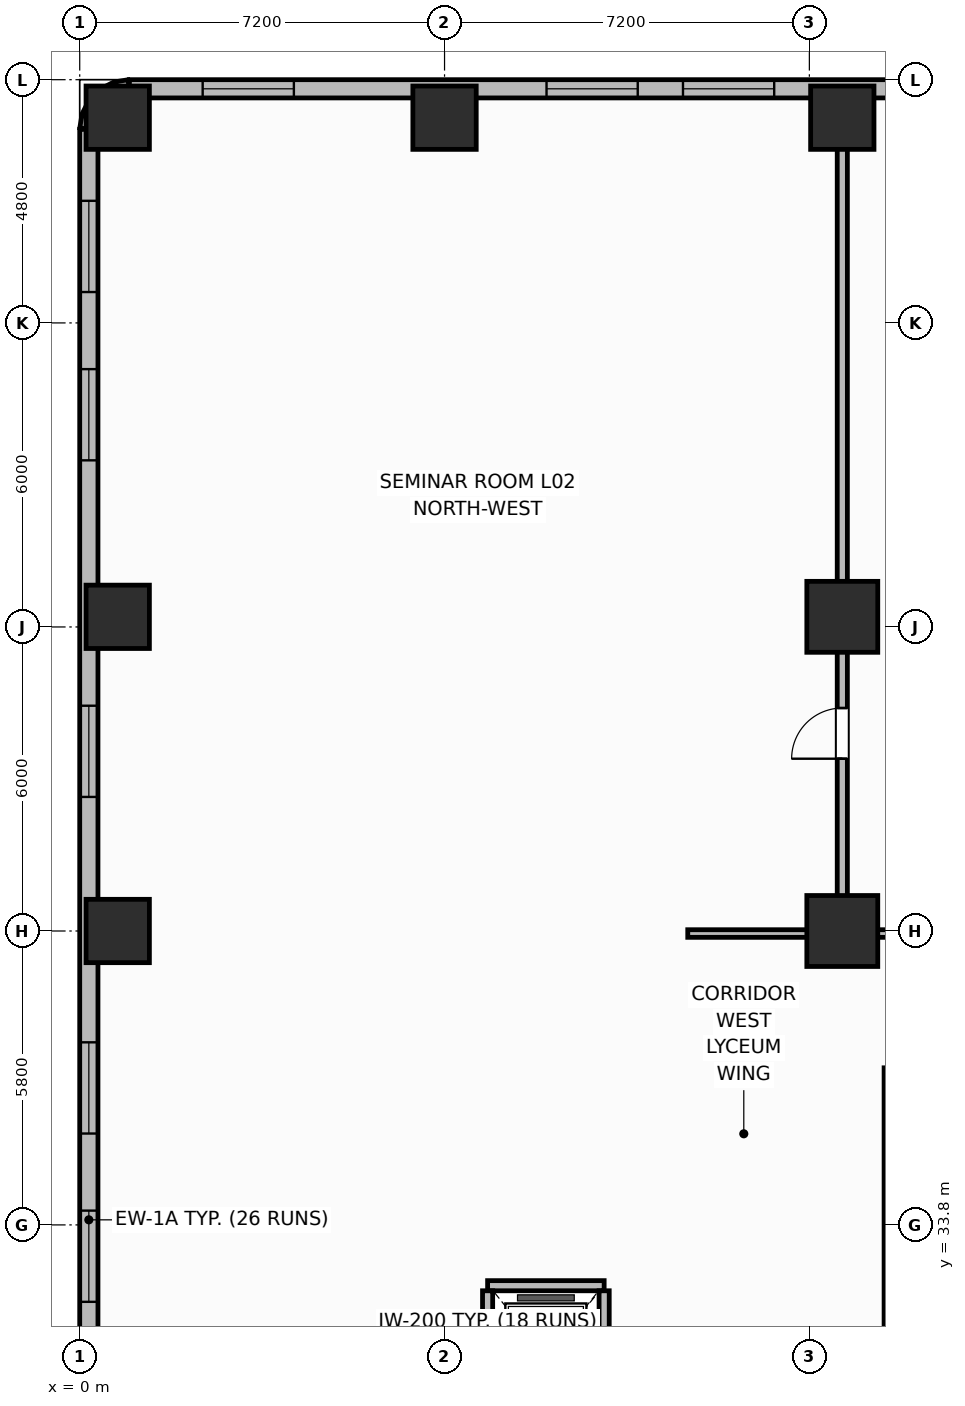
"""IFC4 building model, lengths in metres.
Left out: names, types, materials, properties, quantities, classifications, styles, units other than length and angle.
Written with IfcOpenShell. Run it as: python <this file> out.ifc"""

import sys

from ifc_helpers import new_model, si_unit, direction, frame, frame_2d, origin, origin_2d, place, context, subcontext, project, spatial, rectangle, extrude, element, fill, save


model = new_model("IFC4")
c1 = context("Model", 3, precision=1e-05, world=origin(), true_north=direction((0.0, 1.0)))
c2 = subcontext(c1, "Body", "Model", "MODEL_VIEW")
j1 = project(units=[si_unit("LENGTHUNIT", "METRE"), si_unit("PLANEANGLEUNIT", "RADIAN")], contexts=[c1])
p1 = place(None, origin())
s1 = spatial("IfcSite", under=j1, at=p1, CompositionType="ELEMENT")
p2 = place(p1, origin())
s2 = spatial("IfcBuilding", under=s1, at=p2, CompositionType="ELEMENT")
p3 = place(p2, frame((0.0, 0.0, 11.1)))
s3 = spatial("IfcBuildingStorey", under=s2, at=p3, CompositionType="ELEMENT", Elevation=11.1)
for number, where, z_axis, x_axis in (
    (1, (0.75, 39.6, 0.0), (0.0, 0.0, 1.0), (1.0, 0.0, 0.0)),
    (2, (0.75, 45.8, 0.0), (0.0, 0.0, 1.0), (1.0, 0.0, 0.0)),
    (3, (0.75, 55.65, 0.0), (0.0, 0.0, 1.0), (1.0, 0.0, 0.0)),
    (4, (7.2, 55.65, 0.0), (0.0, 0.0, 1.0), (1.0, 0.0, 0.0)),
    (5, (15.05, 55.65, 0.0), (0.0, 0.0, 1.0), (1.0, 0.0, 0.0)),
):
    element("IfcColumn", number, at=place(p3, frame(where, z_axis=z_axis, x_axis=x_axis)), inside=s3, PredefinedType="COLUMN", context=c2, shape_type="SweptSolid", body=[
        extrude(rectangle(XDim=1.25, YDim=1.25, at=origin_2d()), origin(), (0.0, 0.0, 1.0), 4.5),
    ])
for number, where, z_axis, x_axis in (
    (6, (15.05, 39.6, 0.0), (0.0, 0.0, 1.0), (1.0, 0.0, 0.0)),
    (7, (15.05, 45.8, 0.0), (0.0, 0.0, 1.0), (1.0, 0.0, 0.0)),
):
    element("IfcColumn", number, at=place(p3, frame(where, z_axis=z_axis, x_axis=x_axis)), inside=s3, PredefinedType="COLUMN", context=c2, shape_type="SweptSolid", body=[
        extrude(rectangle(XDim=1.4, YDim=1.4, at=origin_2d()), origin(), (0.0, 0.0, 1.0), 4.5),
    ])
p4 = place(p3, frame((56.57, 56.22, 0.0), z_axis=(0.0, 0.0, 1.0), x_axis=(-1.0, 0.0, 0.0)))
e8 = element("IfcWall", 8, at=p4, inside=s3, PredefinedType="SOLIDWALL", context=c2, shape_type="SweptSolid", body=[
    extrude(rectangle(XDim=55.59, YDim=0.36, at=frame_2d((27.795, 0.0))), origin(), (0.0, 0.0, 1.0), 3.48),
])
p5 = place(p4, frame((0.747, 0.0, 0.9)))
e9 = element("IfcOpeningElement", 9, at=p5, cuts=e8, PredefinedType="OPENING", context=c2, shape_type="SweptSolid", body=[
    extrude(rectangle(XDim=1.8, YDim=2.1, at=frame_2d((0.9, 1.05))), frame((0.0, 0.19, 0.0), z_axis=(0.0, -1.0, 0.0), x_axis=(1.0, 0.0, 0.0)), (0.0, 0.0, 1.0), 0.38),
])
p6 = place(p4, frame((5.19, 0.0, 0.9)))
e10 = element("IfcOpeningElement", 10, at=p6, cuts=e8, PredefinedType="OPENING", context=c2, shape_type="SweptSolid", body=[
    extrude(rectangle(XDim=1.8, YDim=2.1, at=frame_2d((0.9, 1.05))), frame((0.0, 0.19, 0.0), z_axis=(0.0, -1.0, 0.0), x_axis=(1.0, 0.0, 0.0)), (0.0, 0.0, 1.0), 0.38),
])
p7 = place(p4, frame((8.233, 0.0, 0.9)))
e11 = element("IfcOpeningElement", 11, at=p7, cuts=e8, PredefinedType="OPENING", context=c2, shape_type="SweptSolid", body=[
    extrude(rectangle(XDim=1.8, YDim=2.1, at=frame_2d((0.9, 1.05))), frame((0.0, 0.19, 0.0), z_axis=(0.0, -1.0, 0.0), x_axis=(1.0, 0.0, 0.0)), (0.0, 0.0, 1.0), 0.38),
])
p8 = place(p4, frame((11.626, 0.0, 0.9)))
e12 = element("IfcOpeningElement", 12, at=p8, cuts=e8, PredefinedType="OPENING", context=c2, shape_type="SweptSolid", body=[
    extrude(rectangle(XDim=1.8, YDim=2.1, at=frame_2d((0.9, 1.05))), frame((0.0, 0.19, 0.0), z_axis=(0.0, -1.0, 0.0), x_axis=(1.0, 0.0, 0.0)), (0.0, 0.0, 1.0), 0.38),
])
p9 = place(p4, frame((14.319, 0.0, 0.9)))
e13 = element("IfcOpeningElement", 13, at=p9, cuts=e8, PredefinedType="OPENING", context=c2, shape_type="SweptSolid", body=[
    extrude(rectangle(XDim=1.8, YDim=2.1, at=frame_2d((0.9, 1.05))), frame((0.0, 0.19, 0.0), z_axis=(0.0, -1.0, 0.0), x_axis=(1.0, 0.0, 0.0)), (0.0, 0.0, 1.0), 0.38),
])
p10 = place(p4, frame((18.762, 0.0, 0.9)))
e14 = element("IfcOpeningElement", 14, at=p10, cuts=e8, PredefinedType="OPENING", context=c2, shape_type="SweptSolid", body=[
    extrude(rectangle(XDim=1.8, YDim=2.1, at=frame_2d((0.9, 1.05))), frame((0.0, 0.19, 0.0), z_axis=(0.0, -1.0, 0.0), x_axis=(1.0, 0.0, 0.0)), (0.0, 0.0, 1.0), 0.38),
])
p11 = place(p4, frame((21.805, 0.0, 0.9)))
e15 = element("IfcOpeningElement", 15, at=p11, cuts=e8, PredefinedType="OPENING", context=c2, shape_type="SweptSolid", body=[
    extrude(rectangle(XDim=1.8, YDim=2.1, at=frame_2d((0.9, 1.05))), frame((0.0, 0.19, 0.0), z_axis=(0.0, -1.0, 0.0), x_axis=(1.0, 0.0, 0.0)), (0.0, 0.0, 1.0), 0.38),
])
p12 = place(p4, frame((25.198, 0.0, 0.9)))
e16 = element("IfcOpeningElement", 16, at=p12, cuts=e8, PredefinedType="OPENING", context=c2, shape_type="SweptSolid", body=[
    extrude(rectangle(XDim=1.8, YDim=2.1, at=frame_2d((0.9, 1.05))), frame((0.0, 0.19, 0.0), z_axis=(0.0, -1.0, 0.0), x_axis=(1.0, 0.0, 0.0)), (0.0, 0.0, 1.0), 0.38),
])
p13 = place(p4, frame((27.892, 0.0, 0.9)))
e17 = element("IfcOpeningElement", 17, at=p13, cuts=e8, PredefinedType="OPENING", context=c2, shape_type="SweptSolid", body=[
    extrude(rectangle(XDim=1.8, YDim=2.1, at=frame_2d((0.9, 1.05))), frame((0.0, 0.19, 0.0), z_axis=(0.0, -1.0, 0.0), x_axis=(1.0, 0.0, 0.0)), (0.0, 0.0, 1.0), 0.38),
])
p14 = place(p4, frame((32.335, 0.0, 0.9)))
e18 = element("IfcOpeningElement", 18, at=p14, cuts=e8, PredefinedType="OPENING", context=c2, shape_type="SweptSolid", body=[
    extrude(rectangle(XDim=1.8, YDim=2.1, at=frame_2d((0.9, 1.05))), frame((0.0, 0.19, 0.0), z_axis=(0.0, -1.0, 0.0), x_axis=(1.0, 0.0, 0.0)), (0.0, 0.0, 1.0), 0.38),
])
p15 = place(p4, frame((35.378, 0.0, 0.9)))
e19 = element("IfcOpeningElement", 19, at=p15, cuts=e8, PredefinedType="OPENING", context=c2, shape_type="SweptSolid", body=[
    extrude(rectangle(XDim=1.8, YDim=2.1, at=frame_2d((0.9, 1.05))), frame((0.0, 0.19, 0.0), z_axis=(0.0, -1.0, 0.0), x_axis=(1.0, 0.0, 0.0)), (0.0, 0.0, 1.0), 0.38),
])
p16 = place(p4, frame((38.421, 0.0, 0.9)))
e20 = element("IfcOpeningElement", 20, at=p16, cuts=e8, PredefinedType="OPENING", context=c2, shape_type="SweptSolid", body=[
    extrude(rectangle(XDim=1.8, YDim=2.1, at=frame_2d((0.9, 1.05))), frame((0.0, 0.19, 0.0), z_axis=(0.0, -1.0, 0.0), x_axis=(1.0, 0.0, 0.0)), (0.0, 0.0, 1.0), 0.38),
])
p17 = place(p4, frame((42.864, 0.0, 0.9)))
e21 = element("IfcOpeningElement", 21, at=p17, cuts=e8, PredefinedType="OPENING", context=c2, shape_type="SweptSolid", body=[
    extrude(rectangle(XDim=1.8, YDim=2.1, at=frame_2d((0.9, 1.05))), frame((0.0, 0.19, 0.0), z_axis=(0.0, -1.0, 0.0), x_axis=(1.0, 0.0, 0.0)), (0.0, 0.0, 1.0), 0.38),
])
p18 = place(p4, frame((45.557, 0.0, 0.9)))
e22 = element("IfcOpeningElement", 22, at=p18, cuts=e8, PredefinedType="OPENING", context=c2, shape_type="SweptSolid", body=[
    extrude(rectangle(XDim=1.8, YDim=2.1, at=frame_2d((0.9, 1.05))), frame((0.0, 0.19, 0.0), z_axis=(0.0, -1.0, 0.0), x_axis=(1.0, 0.0, 0.0)), (0.0, 0.0, 1.0), 0.38),
])
p19 = place(p4, frame((52.344, 0.0, 0.9)))
e23 = element("IfcOpeningElement", 23, at=p19, cuts=e8, PredefinedType="OPENING", context=c2, shape_type="SweptSolid", body=[
    extrude(rectangle(XDim=1.8, YDim=2.1, at=frame_2d((0.9, 1.05))), frame((0.0, 0.19, 0.0), z_axis=(0.0, -1.0, 0.0), x_axis=(1.0, 0.0, 0.0)), (0.0, 0.0, 1.0), 0.38),
])
p20 = place(p3, frame((0.98, 56.22, 0.0), z_axis=(0.0, 0.0, 1.0), x_axis=(-0.987731290312, -0.156163049852, 0.0)))
e24 = element("IfcWall", 24, at=p20, inside=s3, PredefinedType="SOLIDWALL", context=c2, shape_type="SweptSolid", body=[
    extrude(rectangle(XDim=0.25, YDim=0.36, at=frame_2d((0.125, 0.0))), origin(), (0.0, 0.0, 1.0), 3.48),
])
p21 = place(p3, frame((0.733, 56.181, 0.0), z_axis=(0.0, 0.0, 1.0), x_axis=(-0.89089067942, -0.454217786225, 0.0)))
e25 = element("IfcWall", 25, at=p21, inside=s3, PredefinedType="SOLIDWALL", context=c2, shape_type="SweptSolid", body=[
    extrude(rectangle(XDim=0.25, YDim=0.36, at=frame_2d((0.125, 0.0))), origin(), (0.0, 0.0, 1.0), 3.48),
])
for number, where, z_axis, x_axis in (
    (26, (0.51, 56.067, 0.0), (0.0, 0.0, 1.0), (-0.707, -0.707, 0.0)),
    (27, (0.333, 55.89, 0.0), (0.0, 0.0, 1.0), (-0.454, -0.891, 0.0)),
):
    element("IfcWall", number, at=place(p3, frame(where, z_axis=z_axis, x_axis=x_axis)), inside=s3, PredefinedType="SOLIDWALL", context=c2, shape_type="SweptSolid", body=[
        extrude(rectangle(XDim=0.25, YDim=0.36, at=frame_2d((0.125, 0.0))), origin(), (0.0, 0.0, 1.0), 3.48),
    ])
p22 = place(p3, frame((0.219, 55.667, 0.0), z_axis=(0.0, 0.0, 1.0), x_axis=(-0.156963773077, -0.987604361038, 0.0)))
e28 = element("IfcWall", 28, at=p22, inside=s3, PredefinedType="SOLIDWALL", context=c2, shape_type="SweptSolid", body=[
    extrude(rectangle(XDim=0.25, YDim=0.36, at=frame_2d((0.125, 0.0))), origin(), (0.0, 0.0, 1.0), 3.48),
])
p23 = place(p3, frame((0.18, 55.42, 0.0), z_axis=(0.0, 0.0, 1.0), x_axis=(0.0, -1.0, 0.0)))
e29 = element("IfcWall", 29, at=p23, inside=s3, PredefinedType="SOLIDWALL", context=c2, shape_type="SweptSolid", body=[
    extrude(rectangle(XDim=54.44, YDim=0.36, at=frame_2d((27.22, 0.0))), origin(), (0.0, 0.0, 1.0), 3.48),
])
p24 = place(p23, frame((1.411, 0.0, 0.9)))
e30 = element("IfcOpeningElement", 30, at=p24, cuts=e29, PredefinedType="OPENING", context=c2, shape_type="SweptSolid", body=[
    extrude(rectangle(XDim=1.8, YDim=2.1, at=frame_2d((0.9, 1.05))), frame((0.0, 0.19, 0.0), z_axis=(0.0, -1.0, 0.0), x_axis=(1.0, 0.0, 0.0)), (0.0, 0.0, 1.0), 0.38),
])
p25 = place(p23, frame((4.732, 0.0, 0.9)))
e31 = element("IfcOpeningElement", 31, at=p25, cuts=e29, PredefinedType="OPENING", context=c2, shape_type="SweptSolid", body=[
    extrude(rectangle(XDim=1.8, YDim=2.1, at=frame_2d((0.9, 1.05))), frame((0.0, 0.19, 0.0), z_axis=(0.0, -1.0, 0.0), x_axis=(1.0, 0.0, 0.0)), (0.0, 0.0, 1.0), 0.38),
])
p26 = place(p23, frame((11.375, 0.0, 0.9)))
e32 = element("IfcOpeningElement", 32, at=p26, cuts=e29, PredefinedType="OPENING", context=c2, shape_type="SweptSolid", body=[
    extrude(rectangle(XDim=1.8, YDim=2.1, at=frame_2d((0.9, 1.05))), frame((0.0, 0.19, 0.0), z_axis=(0.0, -1.0, 0.0), x_axis=(1.0, 0.0, 0.0)), (0.0, 0.0, 1.0), 0.38),
])
p27 = place(p23, frame((18.017, 0.0, 0.9)))
e33 = element("IfcOpeningElement", 33, at=p27, cuts=e29, PredefinedType="OPENING", context=c2, shape_type="SweptSolid", body=[
    extrude(rectangle(XDim=1.8, YDim=2.1, at=frame_2d((0.9, 1.05))), frame((0.0, 0.19, 0.0), z_axis=(0.0, -1.0, 0.0), x_axis=(1.0, 0.0, 0.0)), (0.0, 0.0, 1.0), 0.38),
])
p28 = place(p23, frame((21.338, 0.0, 0.9)))
e34 = element("IfcOpeningElement", 34, at=p28, cuts=e29, PredefinedType="OPENING", context=c2, shape_type="SweptSolid", body=[
    extrude(rectangle(XDim=1.8, YDim=2.1, at=frame_2d((0.9, 1.05))), frame((0.0, 0.19, 0.0), z_axis=(0.0, -1.0, 0.0), x_axis=(1.0, 0.0, 0.0)), (0.0, 0.0, 1.0), 0.38),
])
p29 = place(p23, frame((23.959, 0.0, 0.9)))
e35 = element("IfcOpeningElement", 35, at=p29, cuts=e29, PredefinedType="OPENING", context=c2, shape_type="SweptSolid", body=[
    extrude(rectangle(XDim=1.8, YDim=2.1, at=frame_2d((0.9, 1.05))), frame((0.0, 0.19, 0.0), z_axis=(0.0, -1.0, 0.0), x_axis=(1.0, 0.0, 0.0)), (0.0, 0.0, 1.0), 0.38),
])
p30 = place(p23, frame((28.681, 0.0, 0.9)))
e36 = element("IfcOpeningElement", 36, at=p30, cuts=e29, PredefinedType="OPENING", context=c2, shape_type="SweptSolid", body=[
    extrude(rectangle(XDim=1.8, YDim=2.1, at=frame_2d((0.9, 1.05))), frame((0.0, 0.19, 0.0), z_axis=(0.0, -1.0, 0.0), x_axis=(1.0, 0.0, 0.0)), (0.0, 0.0, 1.0), 0.38),
])
p31 = place(p23, frame((31.302, 0.0, 0.9)))
e37 = element("IfcOpeningElement", 37, at=p31, cuts=e29, PredefinedType="OPENING", context=c2, shape_type="SweptSolid", body=[
    extrude(rectangle(XDim=1.8, YDim=2.1, at=frame_2d((0.9, 1.05))), frame((0.0, 0.19, 0.0), z_axis=(0.0, -1.0, 0.0), x_axis=(1.0, 0.0, 0.0)), (0.0, 0.0, 1.0), 0.38),
])
p32 = place(p23, frame((34.623, 0.0, 0.9)))
e38 = element("IfcOpeningElement", 38, at=p32, cuts=e29, PredefinedType="OPENING", context=c2, shape_type="SweptSolid", body=[
    extrude(rectangle(XDim=1.8, YDim=2.1, at=frame_2d((0.9, 1.05))), frame((0.0, 0.19, 0.0), z_axis=(0.0, -1.0, 0.0), x_axis=(1.0, 0.0, 0.0)), (0.0, 0.0, 1.0), 0.38),
])
p33 = place(p23, frame((41.266, 0.0, 0.9)))
e39 = element("IfcOpeningElement", 39, at=p33, cuts=e29, PredefinedType="OPENING", context=c2, shape_type="SweptSolid", body=[
    extrude(rectangle(XDim=1.8, YDim=2.1, at=frame_2d((0.9, 1.05))), frame((0.0, 0.19, 0.0), z_axis=(0.0, -1.0, 0.0), x_axis=(1.0, 0.0, 0.0)), (0.0, 0.0, 1.0), 0.38),
])
p34 = place(p23, frame((47.908, 0.0, 0.9)))
e40 = element("IfcOpeningElement", 40, at=p34, cuts=e29, PredefinedType="OPENING", context=c2, shape_type="SweptSolid", body=[
    extrude(rectangle(XDim=1.8, YDim=2.1, at=frame_2d((0.9, 1.05))), frame((0.0, 0.19, 0.0), z_axis=(0.0, -1.0, 0.0), x_axis=(1.0, 0.0, 0.0)), (0.0, 0.0, 1.0), 0.38),
])
p35 = place(p23, frame((51.229, 0.0, 0.9)))
e41 = element("IfcOpeningElement", 41, at=p35, cuts=e29, PredefinedType="OPENING", context=c2, shape_type="SweptSolid", body=[
    extrude(rectangle(XDim=1.8, YDim=2.1, at=frame_2d((0.9, 1.05))), frame((0.0, 0.19, 0.0), z_axis=(0.0, -1.0, 0.0), x_axis=(1.0, 0.0, 0.0)), (0.0, 0.0, 1.0), 0.38),
])
p36 = place(p3, frame((8.05, 32.6, 0.0), z_axis=(0.0, 0.0, 1.0), x_axis=(1.0, 0.0, 0.0)))
e42 = element("IfcWall", 42, at=p36, inside=s3, PredefinedType="PARTITIONING", context=c2, shape_type="SweptSolid", body=[
    extrude(rectangle(XDim=2.3, YDim=0.2, at=frame_2d((1.15, 0.0))), origin(), (0.0, 0.0, 1.0), 3.42),
])
for number, where, z_axis, x_axis in (
    (43, (8.05, 29.9, 0.0), (0.0, 0.0, 1.0), (0.0, 1.0, 0.0)),
    (44, (10.35, 29.9, 0.0), (0.0, 0.0, 1.0), (0.0, 1.0, 0.0)),
):
    element("IfcWall", number, at=place(p3, frame(where, z_axis=z_axis, x_axis=x_axis)), inside=s3, PredefinedType="PARTITIONING", context=c2, shape_type="SweptSolid", body=[
        extrude(rectangle(XDim=2.6, YDim=0.2, at=frame_2d((1.3, 0.0))), origin(), (0.0, 0.0, 1.0), 3.42),
    ])
p37 = place(p3, frame((15.95, 19.5, 0.0), z_axis=(0.0, 0.0, 1.0), x_axis=(0.0, 1.0, 0.0)))
e45 = element("IfcWall", 45, at=p37, inside=s3, PredefinedType="PARTITIONING", context=c2, shape_type="SweptSolid", body=[
    extrude(rectangle(XDim=17.4, YDim=0.15, at=frame_2d((8.7, 0.0))), origin(), (0.0, 0.0, 1.0), 3.42),
])
p38 = place(p3, frame((15.05, 39.6, 0.0), z_axis=(0.0, 0.0, 1.0), x_axis=(0.0, 1.0, 0.0)))
e46 = element("IfcWall", 46, at=p38, inside=s3, PredefinedType="PARTITIONING", context=c2, shape_type="SweptSolid", body=[
    extrude(rectangle(XDim=16.4, YDim=0.2, at=frame_2d((8.2, 0.0))), origin(), (0.0, 0.0, 1.0), 3.42),
])
p39 = place(p38, frame((3.4, 0.0, 0.0)))
e47 = element("IfcOpeningElement", 47, at=p39, cuts=e46, PredefinedType="OPENING", context=c2, shape_type="SweptSolid", body=[
    extrude(rectangle(XDim=1.0, YDim=2.15, at=frame_2d((0.5, 1.075))), frame((0.0, 0.11, 0.0), z_axis=(0.0, -1.0, 0.0), x_axis=(1.0, 0.0, 0.0)), (0.0, 0.0, 1.0), 0.22),
])
p40 = place(p3, frame((25.25, 39.55, 0.0), z_axis=(0.0, 0.0, 1.0), x_axis=(-1.0, 0.0, 0.0)))
e48 = element("IfcWall", 48, at=p40, inside=s3, PredefinedType="PARTITIONING", context=c2, shape_type="SweptSolid", body=[
    extrude(rectangle(XDim=13.25, YDim=0.15, at=frame_2d((6.625, 0.0))), origin(), (0.0, 0.0, 1.0), 3.42),
])
p41 = place(p40, frame((4.2, 0.0, 0.0)))
e49 = element("IfcOpeningElement", 49, at=p41, cuts=e48, PredefinedType="OPENING", context=c2, shape_type="SweptSolid", body=[
    extrude(rectangle(XDim=1.0, YDim=2.15, at=frame_2d((0.5, 1.075))), frame((0.0, 0.085, 0.0), z_axis=(0.0, -1.0, 0.0), x_axis=(1.0, 0.0, 0.0)), (0.0, 0.0, 1.0), 0.17),
])
p42 = place(p17, origin())
e50 = element("IfcWindow", 50, at=p42, inside=s3, PartitioningType="SINGLE_PANEL", PredefinedType="WINDOW", context=c2, shape_type="SweptSolid", body=[
    extrude(rectangle(XDim=1.8, YDim=2.1, at=frame_2d((0.9, 1.05))), frame((0.0, 0.03, 0.0), z_axis=(0.0, -1.0, 0.0), x_axis=(1.0, 0.0, 0.0)), (0.0, 0.0, 1.0), 0.06),
])
fill(e21, e50)
p43 = place(p18, origin())
e51 = element("IfcWindow", 51, at=p43, inside=s3, PartitioningType="SINGLE_PANEL", PredefinedType="WINDOW", context=c2, shape_type="SweptSolid", body=[
    extrude(rectangle(XDim=1.8, YDim=2.1, at=frame_2d((0.9, 1.05))), frame((0.0, 0.03, 0.0), z_axis=(0.0, -1.0, 0.0), x_axis=(1.0, 0.0, 0.0)), (0.0, 0.0, 1.0), 0.06),
])
fill(e22, e51)
p44 = place(p19, origin())
e52 = element("IfcWindow", 52, at=p44, inside=s3, PartitioningType="SINGLE_PANEL", PredefinedType="WINDOW", context=c2, shape_type="SweptSolid", body=[
    extrude(rectangle(XDim=1.8, YDim=2.1, at=frame_2d((0.9, 1.05))), frame((0.0, 0.03, 0.0), z_axis=(0.0, -1.0, 0.0), x_axis=(1.0, 0.0, 0.0)), (0.0, 0.0, 1.0), 0.06),
])
fill(e23, e52)
p45 = place(p24, origin())
e53 = element("IfcWindow", 53, at=p45, inside=s3, PartitioningType="SINGLE_PANEL", PredefinedType="WINDOW", context=c2, shape_type="SweptSolid", body=[
    extrude(rectangle(XDim=1.8, YDim=2.1, at=frame_2d((0.9, 1.05))), frame((0.0, 0.03, 0.0), z_axis=(0.0, -1.0, 0.0), x_axis=(1.0, 0.0, 0.0)), (0.0, 0.0, 1.0), 0.06),
])
fill(e30, e53)
p46 = place(p25, origin())
e54 = element("IfcWindow", 54, at=p46, inside=s3, PartitioningType="SINGLE_PANEL", PredefinedType="WINDOW", context=c2, shape_type="SweptSolid", body=[
    extrude(rectangle(XDim=1.8, YDim=2.1, at=frame_2d((0.9, 1.05))), frame((0.0, 0.03, 0.0), z_axis=(0.0, -1.0, 0.0), x_axis=(1.0, 0.0, 0.0)), (0.0, 0.0, 1.0), 0.06),
])
fill(e31, e54)
p47 = place(p26, origin())
e55 = element("IfcWindow", 55, at=p47, inside=s3, PartitioningType="SINGLE_PANEL", PredefinedType="WINDOW", context=c2, shape_type="SweptSolid", body=[
    extrude(rectangle(XDim=1.8, YDim=2.1, at=frame_2d((0.9, 1.05))), frame((0.0, 0.03, 0.0), z_axis=(0.0, -1.0, 0.0), x_axis=(1.0, 0.0, 0.0)), (0.0, 0.0, 1.0), 0.06),
])
fill(e32, e55)
p48 = place(p27, origin())
e56 = element("IfcWindow", 56, at=p48, inside=s3, PartitioningType="SINGLE_PANEL", PredefinedType="WINDOW", context=c2, shape_type="SweptSolid", body=[
    extrude(rectangle(XDim=1.8, YDim=2.1, at=frame_2d((0.9, 1.05))), frame((0.0, 0.03, 0.0), z_axis=(0.0, -1.0, 0.0), x_axis=(1.0, 0.0, 0.0)), (0.0, 0.0, 1.0), 0.06),
])
fill(e33, e56)
p49 = place(p28, origin())
e57 = element("IfcWindow", 57, at=p49, inside=s3, PartitioningType="SINGLE_PANEL", PredefinedType="WINDOW", context=c2, shape_type="SweptSolid", body=[
    extrude(rectangle(XDim=1.8, YDim=2.1, at=frame_2d((0.9, 1.05))), frame((0.0, 0.03, 0.0), z_axis=(0.0, -1.0, 0.0), x_axis=(1.0, 0.0, 0.0)), (0.0, 0.0, 1.0), 0.06),
])
fill(e34, e57)
p50 = place(p39, origin())
e58 = element("IfcDoor", 58, at=p50, inside=s3, OperationType="SINGLE_SWING_LEFT", PredefinedType="DOOR", context=c2, shape_type="SweptSolid", body=[
    extrude(rectangle(XDim=1.0, YDim=2.15, at=frame_2d((0.5, 1.075))), frame((0.0, 0.025, 0.0), z_axis=(0.0, -1.0, 0.0), x_axis=(1.0, 0.0, 0.0)), (0.0, 0.0, 1.0), 0.05),
])
fill(e47, e58)
save(model, sys.argv[1])
